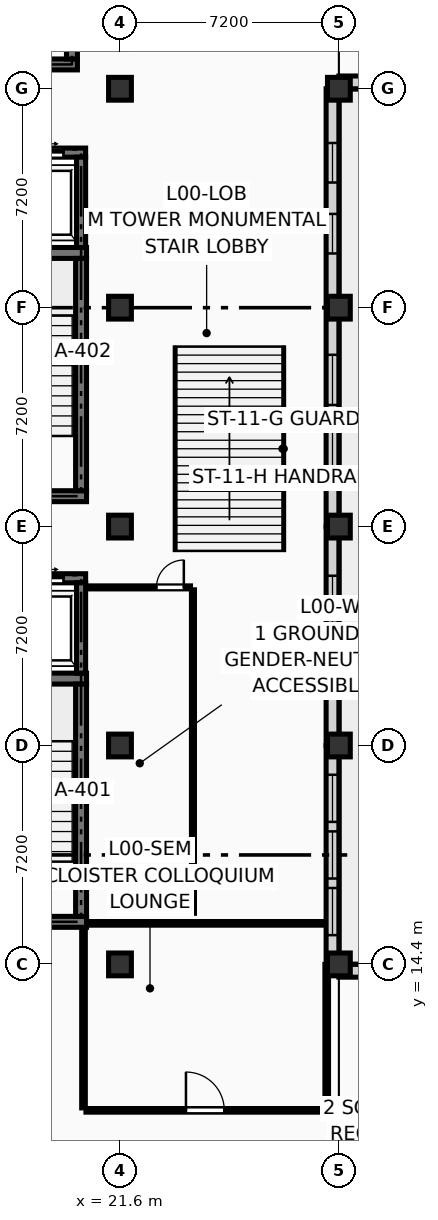
"""IFC4 building model, lengths in metres.
Left out: names, types, materials, properties, quantities, classifications, styles, units other than length and angle.
Written with IfcOpenShell. Run it as: python <this file> out.ifc"""

import sys

from ifc_helpers import new_model, si_unit, direction, frame, frame_2d, origin, origin_2d, place, context, subcontext, project, spatial, rectangle, extrude, element, fill, save


model = new_model("IFC4")
c1 = context("Model", 3, precision=1e-05, world=origin(), true_north=direction((0.0, 1.0)))
c2 = subcontext(c1, "Body", "Model", "MODEL_VIEW")
j1 = project(units=[si_unit("LENGTHUNIT", "METRE"), si_unit("PLANEANGLEUNIT", "RADIAN")], contexts=[c1])
p1 = place(None, origin())
s1 = spatial("IfcSite", under=j1, at=p1, CompositionType="ELEMENT")
p2 = place(p1, origin())
s2 = spatial("IfcBuilding", under=s1, at=p2, CompositionType="ELEMENT")
p3 = place(p2, origin())
s3 = spatial("IfcBuildingStorey", under=s2, at=p3, CompositionType="ELEMENT", Elevation=0.0)
for number, where, z_axis, x_axis in (
    (1, (21.6, 14.4, 0.0), (0.0, 0.0, 1.0), (1.0, 0.0, 0.0)),
    (2, (21.6, 21.6, 0.0), (0.0, 0.0, 1.0), (1.0, 0.0, 0.0)),
    (3, (21.6, 28.8, 0.0), (0.0, 0.0, 1.0), (1.0, 0.0, 0.0)),
    (4, (21.6, 36.0, 0.0), (0.0, 0.0, 1.0), (1.0, 0.0, 0.0)),
    (5, (21.6, 43.2, 0.0), (0.0, 0.0, 1.0), (1.0, 0.0, 0.0)),
    (6, (28.8, 14.4, 0.0), (0.0, 0.0, 1.0), (1.0, 0.0, 0.0)),
    (7, (28.8, 21.6, 0.0), (0.0, 0.0, 1.0), (1.0, 0.0, 0.0)),
    (8, (28.8, 28.8, 0.0), (0.0, 0.0, 1.0), (1.0, 0.0, 0.0)),
    (9, (28.8, 36.0, 0.0), (0.0, 0.0, 1.0), (1.0, 0.0, 0.0)),
    (10, (28.8, 43.2, 0.0), (0.0, 0.0, 1.0), (1.0, 0.0, 0.0)),
):
    element("IfcColumn", number, at=place(p3, frame(where, z_axis=z_axis, x_axis=x_axis)), inside=s3, PredefinedType="COLUMN", context=c2, shape_type="SweptSolid", body=[
        extrude(rectangle(XDim=0.75, YDim=0.75, at=origin_2d()), origin(), (0.0, 0.0, 1.0), 4.5),
    ])
p4 = place(p3, frame((28.8, 43.41, 0.0), z_axis=(0.0, 0.0, 1.0), x_axis=(1.0, 0.0, 0.0)))
e11 = element("IfcWall", 11, at=p4, inside=s3, PredefinedType="SOLIDWALL", context=c2, shape_type="SweptSolid", body=[
    extrude(rectangle(XDim=7.2, YDim=0.42, at=frame_2d((3.6, 0.0))), origin(), (0.0, 0.0, 1.0), 3.62),
])
p5 = place(p4, frame((1.717, 0.0, 0.45)))
e12 = element("IfcOpeningElement", 12, at=p5, cuts=e11, PredefinedType="OPENING", context=c2, shape_type="SweptSolid", body=[
    extrude(rectangle(XDim=1.4, YDim=2.55, at=frame_2d((0.7, 1.275))), frame((0.0, 0.222, 0.0), z_axis=(0.0, -1.0, 0.0), x_axis=(1.0, 0.0, 0.0)), (0.0, 0.0, 1.0), 0.444),
])
p6 = place(p4, frame((4.083, 0.0, 0.45)))
e13 = element("IfcOpeningElement", 13, at=p6, cuts=e11, PredefinedType="OPENING", context=c2, shape_type="SweptSolid", body=[
    extrude(rectangle(XDim=1.4, YDim=2.55, at=frame_2d((0.7, 1.275))), frame((0.0, 0.222, 0.0), z_axis=(0.0, -1.0, 0.0), x_axis=(1.0, 0.0, 0.0)), (0.0, 0.0, 1.0), 0.444),
])
p7 = place(p3, frame((28.59, 36.0, 0.0), z_axis=(0.0, 0.0, 1.0), x_axis=(0.0, 1.0, 0.0)))
e14 = element("IfcWall", 14, at=p7, inside=s3, PredefinedType="SOLIDWALL", context=c2, shape_type="SweptSolid", body=[
    extrude(rectangle(XDim=7.2, YDim=0.42, at=frame_2d((3.6, 0.0))), origin(), (0.0, 0.0, 1.0), 3.62),
])
p8 = place(p7, frame((1.783, 0.0, 0.45)))
e15 = element("IfcOpeningElement", 15, at=p8, cuts=e14, PredefinedType="OPENING", context=c2, shape_type="SweptSolid", body=[
    extrude(rectangle(XDim=1.3, YDim=2.5, at=frame_2d((0.65, 1.25))), frame((0.0, 0.222, 0.0), z_axis=(0.0, -1.0, 0.0), x_axis=(1.0, 0.0, 0.0)), (0.0, 0.0, 1.0), 0.444),
])
p9 = place(p7, frame((4.117, 0.0, 0.45)))
e16 = element("IfcOpeningElement", 16, at=p9, cuts=e14, PredefinedType="OPENING", context=c2, shape_type="SweptSolid", body=[
    extrude(rectangle(XDim=1.3, YDim=2.5, at=frame_2d((0.65, 1.25))), frame((0.0, 0.222, 0.0), z_axis=(0.0, -1.0, 0.0), x_axis=(1.0, 0.0, 0.0)), (0.0, 0.0, 1.0), 0.444),
])
p10 = place(p3, frame((28.59, 28.8, 0.0), z_axis=(0.0, 0.0, 1.0), x_axis=(0.0, 1.0, 0.0)))
e17 = element("IfcWall", 17, at=p10, inside=s3, PredefinedType="SOLIDWALL", context=c2, shape_type="SweptSolid", body=[
    extrude(rectangle(XDim=7.2, YDim=0.42, at=frame_2d((3.6, 0.0))), origin(), (0.0, 0.0, 1.0), 3.62),
])
p11 = place(p10, frame((1.55, 0.0, 0.45)))
e18 = element("IfcOpeningElement", 18, at=p11, cuts=e17, PredefinedType="OPENING", context=c2, shape_type="SweptSolid", body=[
    extrude(rectangle(XDim=1.65, YDim=2.6, at=frame_2d((0.825, 1.3))), frame((0.0, 0.222, 0.0), z_axis=(0.0, -1.0, 0.0), x_axis=(1.0, 0.0, 0.0)), (0.0, 0.0, 1.0), 0.444),
])
p12 = place(p10, frame((4.0, 0.0, 0.45)))
e19 = element("IfcOpeningElement", 19, at=p12, cuts=e17, PredefinedType="OPENING", context=c2, shape_type="SweptSolid", body=[
    extrude(rectangle(XDim=1.65, YDim=2.6, at=frame_2d((0.825, 1.3))), frame((0.0, 0.222, 0.0), z_axis=(0.0, -1.0, 0.0), x_axis=(1.0, 0.0, 0.0)), (0.0, 0.0, 1.0), 0.444),
])
p13 = place(p3, frame((28.59, 21.6, 0.0), z_axis=(0.0, 0.0, 1.0), x_axis=(0.0, 1.0, 0.0)))
e20 = element("IfcWall", 20, at=p13, inside=s3, PredefinedType="SOLIDWALL", context=c2, shape_type="SweptSolid", body=[
    extrude(rectangle(XDim=7.2, YDim=0.42, at=frame_2d((3.6, 0.0))), origin(), (0.0, 0.0, 1.0), 3.62),
])
p14 = place(p13, frame((1.617, 0.0, 0.45)))
e21 = element("IfcOpeningElement", 21, at=p14, cuts=e20, PredefinedType="OPENING", context=c2, shape_type="SweptSolid", body=[
    extrude(rectangle(XDim=1.55, YDim=2.55, at=frame_2d((0.775, 1.275))), frame((0.0, 0.222, 0.0), z_axis=(0.0, -1.0, 0.0), x_axis=(1.0, 0.0, 0.0)), (0.0, 0.0, 1.0), 0.444),
])
p15 = place(p13, frame((4.033, 0.0, 0.45)))
e22 = element("IfcOpeningElement", 22, at=p15, cuts=e20, PredefinedType="OPENING", context=c2, shape_type="SweptSolid", body=[
    extrude(rectangle(XDim=1.55, YDim=2.55, at=frame_2d((0.775, 1.275))), frame((0.0, 0.222, 0.0), z_axis=(0.0, -1.0, 0.0), x_axis=(1.0, 0.0, 0.0)), (0.0, 0.0, 1.0), 0.444),
])
p16 = place(p3, frame((28.59, 14.4, 0.0), z_axis=(0.0, 0.0, 1.0), x_axis=(0.0, 1.0, 0.0)))
e23 = element("IfcWall", 23, at=p16, inside=s3, PredefinedType="SOLIDWALL", context=c2, shape_type="SweptSolid", body=[
    extrude(rectangle(XDim=7.2, YDim=0.42, at=frame_2d((3.6, 0.0))), origin(), (0.0, 0.0, 1.0), 3.62),
])
p17 = place(p16, frame((0.962, 0.0, 0.18)))
e24 = element("IfcOpeningElement", 24, at=p17, cuts=e23, PredefinedType="OPENING", context=c2, shape_type="SweptSolid", body=[
    extrude(rectangle(XDim=1.55, YDim=3.25, at=frame_2d((0.775, 1.625))), frame((0.0, 0.222, 0.0), z_axis=(0.0, -1.0, 0.0), x_axis=(1.0, 0.0, 0.0)), (0.0, 0.0, 1.0), 0.444),
])
p18 = place(p16, frame((2.825, 0.0, 0.18)))
e25 = element("IfcOpeningElement", 25, at=p18, cuts=e23, PredefinedType="OPENING", context=c2, shape_type="SweptSolid", body=[
    extrude(rectangle(XDim=1.55, YDim=3.25, at=frame_2d((0.775, 1.625))), frame((0.0, 0.222, 0.0), z_axis=(0.0, -1.0, 0.0), x_axis=(1.0, 0.0, 0.0)), (0.0, 0.0, 1.0), 0.444),
])
p19 = place(p16, frame((4.688, 0.0, 0.18)))
e26 = element("IfcOpeningElement", 26, at=p19, cuts=e23, PredefinedType="OPENING", context=c2, shape_type="SweptSolid", body=[
    extrude(rectangle(XDim=1.55, YDim=3.25, at=frame_2d((0.775, 1.625))), frame((0.0, 0.222, 0.0), z_axis=(0.0, -1.0, 0.0), x_axis=(1.0, 0.0, 0.0)), (0.0, 0.0, 1.0), 0.444),
])
p20 = place(p3, frame((28.8, 14.19, 0.0), z_axis=(0.0, 0.0, 1.0), x_axis=(1.0, 0.0, 0.0)))
e27 = element("IfcWall", 27, at=p20, inside=s3, PredefinedType="SOLIDWALL", context=c2, shape_type="SweptSolid", body=[
    extrude(rectangle(XDim=7.2, YDim=0.42, at=frame_2d((3.6, 0.0))), origin(), (0.0, 0.0, 1.0), 3.62),
])
p21 = place(p20, frame((1.75, 0.0, 0.45)))
e28 = element("IfcOpeningElement", 28, at=p21, cuts=e27, PredefinedType="OPENING", context=c2, shape_type="SweptSolid", body=[
    extrude(rectangle(XDim=1.35, YDim=2.45, at=frame_2d((0.675, 1.225))), frame((0.0, 0.222, 0.0), z_axis=(0.0, -1.0, 0.0), x_axis=(1.0, 0.0, 0.0)), (0.0, 0.0, 1.0), 0.444),
])
p22 = place(p20, frame((4.1, 0.0, 0.45)))
e29 = element("IfcOpeningElement", 29, at=p22, cuts=e27, PredefinedType="OPENING", context=c2, shape_type="SweptSolid", body=[
    extrude(rectangle(XDim=1.35, YDim=2.45, at=frame_2d((0.675, 1.225))), frame((0.0, 0.222, 0.0), z_axis=(0.0, -1.0, 0.0), x_axis=(1.0, 0.0, 0.0)), (0.0, 0.0, 1.0), 0.444),
])
for number, where, z_axis, x_axis in (
    (30, (15.62, 15.8, 0.0), (0.0, 0.0, 1.0), (1.0, 0.0, 0.0)),
    (31, (15.62, 23.8, 0.0), (0.0, 0.0, 1.0), (1.0, 0.0, 0.0)),
):
    element("IfcWall", number, at=place(p3, frame(where, z_axis=z_axis, x_axis=x_axis)), inside=s3, PredefinedType="SHEAR", context=c2, shape_type="SweptSolid", body=[
        extrude(rectangle(XDim=4.88, YDim=0.36, at=frame_2d((2.44, 0.0))), origin(), (0.0, 0.0, 1.0), 4.25),
    ])
p23 = place(p3, frame((20.32, 15.98, 0.0), z_axis=(0.0, 0.0, 1.0), x_axis=(0.0, 1.0, 0.0)))
e32 = element("IfcWall", 32, at=p23, inside=s3, PredefinedType="SHEAR", context=c2, shape_type="SweptSolid", body=[
    extrude(rectangle(XDim=7.64, YDim=0.36, at=frame_2d((3.82, 0.0))), origin(), (0.0, 0.0, 1.0), 4.25),
])
for number, where, z_axis, x_axis in (
    (33, (15.62, 29.8, 0.0), (0.0, 0.0, 1.0), (1.0, 0.0, 0.0)),
    (34, (15.62, 37.8, 0.0), (0.0, 0.0, 1.0), (1.0, 0.0, 0.0)),
):
    element("IfcWall", number, at=place(p3, frame(where, z_axis=z_axis, x_axis=x_axis)), inside=s3, PredefinedType="SHEAR", context=c2, shape_type="SweptSolid", body=[
        extrude(rectangle(XDim=4.88, YDim=0.36, at=frame_2d((2.44, 0.0))), origin(), (0.0, 0.0, 1.0), 4.25),
    ])
p24 = place(p3, frame((20.32, 29.98, 0.0), z_axis=(0.0, 0.0, 1.0), x_axis=(0.0, 1.0, 0.0)))
e35 = element("IfcWall", 35, at=p24, inside=s3, PredefinedType="SHEAR", context=c2, shape_type="SweptSolid", body=[
    extrude(rectangle(XDim=7.64, YDim=0.36, at=frame_2d((3.82, 0.0))), origin(), (0.0, 0.0, 1.0), 4.25),
])
p25 = place(p3, frame((15.72, 44.0, 0.0), z_axis=(0.0, 0.0, 1.0), x_axis=(1.0, 0.0, 0.0)))
e36 = element("IfcWall", 36, at=p25, inside=s3, PredefinedType="SHEAR", context=c2, shape_type="SweptSolid", body=[
    extrude(rectangle(XDim=4.48, YDim=0.36, at=frame_2d((2.24, 0.0))), origin(), (0.0, 0.0, 1.0), 4.25),
])
p26 = place(p3, frame((20.02, 44.18, 0.0), z_axis=(0.0, 0.0, 1.0), x_axis=(0.0, 1.0, 0.0)))
e37 = element("IfcWall", 37, at=p26, inside=s3, PredefinedType="SHEAR", context=c2, shape_type="SweptSolid", body=[
    extrude(rectangle(XDim=7.24, YDim=0.36, at=frame_2d((3.62, 0.0))), origin(), (0.0, 0.0, 1.0), 4.25),
])
p27 = place(p3, frame((17.91, 27.1, 0.0), z_axis=(0.0, 0.0, 1.0), x_axis=(1.0, 0.0, 0.0)))
e38 = element("IfcWall", 38, at=p27, inside=s3, PredefinedType="SHEAR", context=c2, shape_type="SweptSolid", body=[
    extrude(rectangle(XDim=2.56, YDim=0.3, at=frame_2d((1.28, 0.0))), origin(), (0.0, 0.0, 1.0), 4.25),
])
p28 = place(p27, frame((0.73, 0.0, 0.0)))
e39 = element("IfcOpeningElement", 39, at=p28, cuts=e38, PredefinedType="OPENING", context=c2, shape_type="SweptSolid", body=[
    extrude(rectangle(XDim=1.1, YDim=2.2, at=frame_2d((0.55, 1.1))), frame((0.0, 0.162, 0.0), z_axis=(0.0, -1.0, 0.0), x_axis=(1.0, 0.0, 0.0)), (0.0, 0.0, 1.0), 0.324),
])
p29 = place(p3, frame((20.32, 23.98, 0.0), z_axis=(0.0, 0.0, 1.0), x_axis=(0.0, 1.0, 0.0)))
e40 = element("IfcWall", 40, at=p29, inside=s3, PredefinedType="SHEAR", context=c2, shape_type="SweptSolid", body=[
    extrude(rectangle(XDim=2.97, YDim=0.3, at=frame_2d((1.485, 0.0))), origin(), (0.0, 0.0, 1.0), 4.25),
])
p30 = place(p3, frame((17.91, 41.1, 0.0), z_axis=(0.0, 0.0, 1.0), x_axis=(1.0, 0.0, 0.0)))
e41 = element("IfcWall", 41, at=p30, inside=s3, PredefinedType="SHEAR", context=c2, shape_type="SweptSolid", body=[
    extrude(rectangle(XDim=2.56, YDim=0.3, at=frame_2d((1.28, 0.0))), origin(), (0.0, 0.0, 1.0), 4.25),
])
p31 = place(p30, frame((0.73, 0.0, 0.0)))
e42 = element("IfcOpeningElement", 42, at=p31, cuts=e41, PredefinedType="OPENING", context=c2, shape_type="SweptSolid", body=[
    extrude(rectangle(XDim=1.1, YDim=2.2, at=frame_2d((0.55, 1.1))), frame((0.0, 0.162, 0.0), z_axis=(0.0, -1.0, 0.0), x_axis=(1.0, 0.0, 0.0)), (0.0, 0.0, 1.0), 0.324),
])
p32 = place(p3, frame((20.32, 37.98, 0.0), z_axis=(0.0, 0.0, 1.0), x_axis=(0.0, 1.0, 0.0)))
e43 = element("IfcWall", 43, at=p32, inside=s3, PredefinedType="SHEAR", context=c2, shape_type="SweptSolid", body=[
    extrude(rectangle(XDim=2.97, YDim=0.3, at=frame_2d((1.485, 0.0))), origin(), (0.0, 0.0, 1.0), 4.25),
])
p33 = place(p3, frame((20.4, 9.68, 0.0), z_axis=(0.0, 0.0, 1.0), x_axis=(0.0, 1.0, 0.0)))
e44 = element("IfcWall", 44, at=p33, inside=s3, PredefinedType="PARTITIONING", context=c2, shape_type="SweptSolid", body=[
    extrude(rectangle(XDim=5.9, YDim=0.12, at=frame_2d((2.95, 0.0))), origin(), (0.0, 0.0, 1.0), 4.235),
])
p34 = place(p3, frame((20.48, 9.6, 0.0), z_axis=(0.0, 0.0, 1.0), x_axis=(1.0, 0.0, 0.0)))
e45 = element("IfcWall", 45, at=p34, inside=s3, PredefinedType="PARTITIONING", context=c2, shape_type="SweptSolid", body=[
    extrude(rectangle(XDim=7.84, YDim=0.12, at=frame_2d((3.92, 0.0))), origin(), (0.0, 0.0, 1.0), 4.235),
])
p35 = place(p34, frame((3.29, 0.0, 0.0)))
e46 = element("IfcOpeningElement", 46, at=p35, cuts=e45, PredefinedType="OPENING", context=c2, shape_type="SweptSolid", body=[
    extrude(rectangle(XDim=1.26, YDim=2.18, at=frame_2d((0.63, 1.09))), frame((0.0, 0.072, 0.0), z_axis=(0.0, -1.0, 0.0), x_axis=(1.0, 0.0, 0.0)), (0.0, 0.0, 1.0), 0.144),
])
p36 = place(p3, frame((28.4, 9.68, 0.0), z_axis=(0.0, 0.0, 1.0), x_axis=(0.0, 1.0, 0.0)))
e47 = element("IfcWall", 47, at=p36, inside=s3, PredefinedType="PARTITIONING", context=c2, shape_type="SweptSolid", body=[
    extrude(rectangle(XDim=4.72, YDim=0.12, at=frame_2d((2.36, 0.0))), origin(), (0.0, 0.0, 1.0), 3.385),
])
p37 = place(p3, frame((20.5, 15.75, 0.0), z_axis=(0.0, 0.0, 1.0), x_axis=(1.0, 0.0, 0.0)))
e48 = element("IfcWall", 48, at=p37, inside=s3, PredefinedType="PARTITIONING", context=c2, shape_type="SweptSolid", body=[
    extrude(rectangle(XDim=7.82, YDim=0.12, at=frame_2d((3.91, 0.0))), origin(), (0.0, 0.0, 1.0), 4.235),
])
p38 = place(p3, frame((24.0, 16.08, 0.0), z_axis=(0.0, 0.0, 1.0), x_axis=(0.0, 1.0, 0.0)))
e49 = element("IfcWall", 49, at=p38, inside=s3, PredefinedType="PARTITIONING", context=c2, shape_type="SweptSolid", body=[
    extrude(rectangle(XDim=10.64, YDim=0.1, at=frame_2d((5.32, 0.0))), origin(), (0.0, 0.0, 1.0), 4.235),
])
p39 = place(p3, frame((20.58, 26.8, 0.0), z_axis=(0.0, 0.0, 1.0), x_axis=(1.0, 0.0, 0.0)))
e50 = element("IfcWall", 50, at=p39, inside=s3, PredefinedType="PARTITIONING", context=c2, shape_type="SweptSolid", body=[
    extrude(rectangle(XDim=3.34, YDim=0.1, at=frame_2d((1.67, 0.0))), origin(), (0.0, 0.0, 1.0), 4.235),
])
p40 = place(p39, frame((2.22, 0.0, 0.0)))
e51 = element("IfcOpeningElement", 51, at=p40, cuts=e50, PredefinedType="OPENING", context=c2, shape_type="SweptSolid", body=[
    extrude(rectangle(XDim=0.9, YDim=2.1, at=frame_2d((0.45, 1.05))), frame((0.0, 0.062, 0.0), z_axis=(0.0, -1.0, 0.0), x_axis=(1.0, 0.0, 0.0)), (0.0, 0.0, 1.0), 0.124),
])
p41 = place(p3, frame((28.88, 9.6, 0.0), z_axis=(0.0, 0.0, 1.0), x_axis=(1.0, 0.0, 0.0)))
e52 = element("IfcWall", 52, at=p41, inside=s3, PredefinedType="PARTITIONING", context=c2, shape_type="SweptSolid", body=[
    extrude(rectangle(XDim=21.44, YDim=0.12, at=frame_2d((10.72, 0.0))), origin(), (0.0, 0.0, 1.0), 4.235),
])
p42 = place(p41, frame((9.87, 0.0, 0.0)))
e53 = element("IfcOpeningElement", 53, at=p42, cuts=e52, PredefinedType="OPENING", context=c2, shape_type="SweptSolid", body=[
    extrude(rectangle(XDim=1.7, YDim=2.28, at=frame_2d((0.85, 1.14))), frame((0.0, 0.072, 0.0), z_axis=(0.0, -1.0, 0.0), x_axis=(1.0, 0.0, 0.0)), (0.0, 0.0, 1.0), 0.144),
])
p43 = place(p8, origin())
e54 = element("IfcWindow", 54, at=p43, inside=s3, PartitioningType="SINGLE_PANEL", PredefinedType="WINDOW", context=c2, shape_type="SweptSolid", body=[
    extrude(rectangle(XDim=1.3, YDim=2.5, at=frame_2d((0.65, 1.25))), frame((0.0, 0.03, 0.0), z_axis=(0.0, -1.0, 0.0), x_axis=(1.0, 0.0, 0.0)), (0.0, 0.0, 1.0), 0.06),
])
fill(e15, e54)
p44 = place(p9, origin())
e55 = element("IfcWindow", 55, at=p44, inside=s3, PartitioningType="SINGLE_PANEL", PredefinedType="WINDOW", context=c2, shape_type="SweptSolid", body=[
    extrude(rectangle(XDim=1.3, YDim=2.5, at=frame_2d((0.65, 1.25))), frame((0.0, 0.03, 0.0), z_axis=(0.0, -1.0, 0.0), x_axis=(1.0, 0.0, 0.0)), (0.0, 0.0, 1.0), 0.06),
])
fill(e16, e55)
p45 = place(p11, origin())
e56 = element("IfcWindow", 56, at=p45, inside=s3, PartitioningType="SINGLE_PANEL", PredefinedType="WINDOW", context=c2, shape_type="SweptSolid", body=[
    extrude(rectangle(XDim=1.65, YDim=2.6, at=frame_2d((0.825, 1.3))), frame((0.0, 0.03, 0.0), z_axis=(0.0, -1.0, 0.0), x_axis=(1.0, 0.0, 0.0)), (0.0, 0.0, 1.0), 0.06),
])
fill(e18, e56)
p46 = place(p12, origin())
e57 = element("IfcWindow", 57, at=p46, inside=s3, PartitioningType="SINGLE_PANEL", PredefinedType="WINDOW", context=c2, shape_type="SweptSolid", body=[
    extrude(rectangle(XDim=1.65, YDim=2.6, at=frame_2d((0.825, 1.3))), frame((0.0, 0.03, 0.0), z_axis=(0.0, -1.0, 0.0), x_axis=(1.0, 0.0, 0.0)), (0.0, 0.0, 1.0), 0.06),
])
fill(e19, e57)
p47 = place(p14, origin())
e58 = element("IfcWindow", 58, at=p47, inside=s3, PartitioningType="SINGLE_PANEL", PredefinedType="WINDOW", context=c2, shape_type="SweptSolid", body=[
    extrude(rectangle(XDim=1.55, YDim=2.55, at=frame_2d((0.775, 1.275))), frame((0.0, 0.03, 0.0), z_axis=(0.0, -1.0, 0.0), x_axis=(1.0, 0.0, 0.0)), (0.0, 0.0, 1.0), 0.06),
])
fill(e21, e58)
p48 = place(p15, origin())
e59 = element("IfcWindow", 59, at=p48, inside=s3, PartitioningType="SINGLE_PANEL", PredefinedType="WINDOW", context=c2, shape_type="SweptSolid", body=[
    extrude(rectangle(XDim=1.55, YDim=2.55, at=frame_2d((0.775, 1.275))), frame((0.0, 0.03, 0.0), z_axis=(0.0, -1.0, 0.0), x_axis=(1.0, 0.0, 0.0)), (0.0, 0.0, 1.0), 0.06),
])
fill(e22, e59)
p49 = place(p17, origin())
e60 = element("IfcWindow", 60, at=p49, inside=s3, PartitioningType="SINGLE_PANEL", PredefinedType="WINDOW", context=c2, shape_type="SweptSolid", body=[
    extrude(rectangle(XDim=1.55, YDim=3.25, at=frame_2d((0.775, 1.625))), frame((0.0, 0.03, 0.0), z_axis=(0.0, -1.0, 0.0), x_axis=(1.0, 0.0, 0.0)), (0.0, 0.0, 1.0), 0.06),
])
fill(e24, e60)
p50 = place(p18, origin())
e61 = element("IfcWindow", 61, at=p50, inside=s3, PartitioningType="SINGLE_PANEL", PredefinedType="WINDOW", context=c2, shape_type="SweptSolid", body=[
    extrude(rectangle(XDim=1.55, YDim=3.25, at=frame_2d((0.775, 1.625))), frame((0.0, 0.03, 0.0), z_axis=(0.0, -1.0, 0.0), x_axis=(1.0, 0.0, 0.0)), (0.0, 0.0, 1.0), 0.06),
])
fill(e25, e61)
p51 = place(p19, origin())
e62 = element("IfcWindow", 62, at=p51, inside=s3, PartitioningType="SINGLE_PANEL", PredefinedType="WINDOW", context=c2, shape_type="SweptSolid", body=[
    extrude(rectangle(XDim=1.55, YDim=3.25, at=frame_2d((0.775, 1.625))), frame((0.0, 0.03, 0.0), z_axis=(0.0, -1.0, 0.0), x_axis=(1.0, 0.0, 0.0)), (0.0, 0.0, 1.0), 0.06),
])
fill(e26, e62)
p52 = place(p28, origin())
e63 = element("IfcDoor", 63, at=p52, inside=s3, OperationType="DOUBLE_DOOR_SLIDING", PredefinedType="DOOR", context=c2, shape_type="SweptSolid", body=[
    extrude(rectangle(XDim=1.1, YDim=2.2, at=frame_2d((0.55, 1.1))), frame((0.0, 0.025, 0.0), z_axis=(0.0, -1.0, 0.0), x_axis=(1.0, 0.0, 0.0)), (0.0, 0.0, 1.0), 0.05),
])
fill(e39, e63)
p53 = place(p31, origin())
e64 = element("IfcDoor", 64, at=p53, inside=s3, OperationType="DOUBLE_DOOR_SLIDING", PredefinedType="DOOR", context=c2, shape_type="SweptSolid", body=[
    extrude(rectangle(XDim=1.1, YDim=2.2, at=frame_2d((0.55, 1.1))), frame((0.0, 0.025, 0.0), z_axis=(0.0, -1.0, 0.0), x_axis=(1.0, 0.0, 0.0)), (0.0, 0.0, 1.0), 0.05),
])
fill(e42, e64)
p54 = place(p35, origin())
e65 = element("IfcDoor", 65, at=p54, inside=s3, OperationType="SINGLE_SWING_LEFT", PredefinedType="DOOR", context=c2, shape_type="SweptSolid", body=[
    extrude(rectangle(XDim=1.26, YDim=2.18, at=frame_2d((0.63, 1.09))), frame((0.0, 0.025, 0.0), z_axis=(0.0, -1.0, 0.0), x_axis=(1.0, 0.0, 0.0)), (0.0, 0.0, 1.0), 0.05),
])
fill(e46, e65)
p55 = place(p40, origin())
e66 = element("IfcDoor", 66, at=p55, inside=s3, OperationType="SINGLE_SWING_RIGHT", PredefinedType="DOOR", context=c2, shape_type="SweptSolid", body=[
    extrude(rectangle(XDim=0.9, YDim=2.1, at=frame_2d((0.45, 1.05))), frame((0.0, 0.025, 0.0), z_axis=(0.0, -1.0, 0.0), x_axis=(1.0, 0.0, 0.0)), (0.0, 0.0, 1.0), 0.05),
])
fill(e51, e66)
save(model, sys.argv[1])
